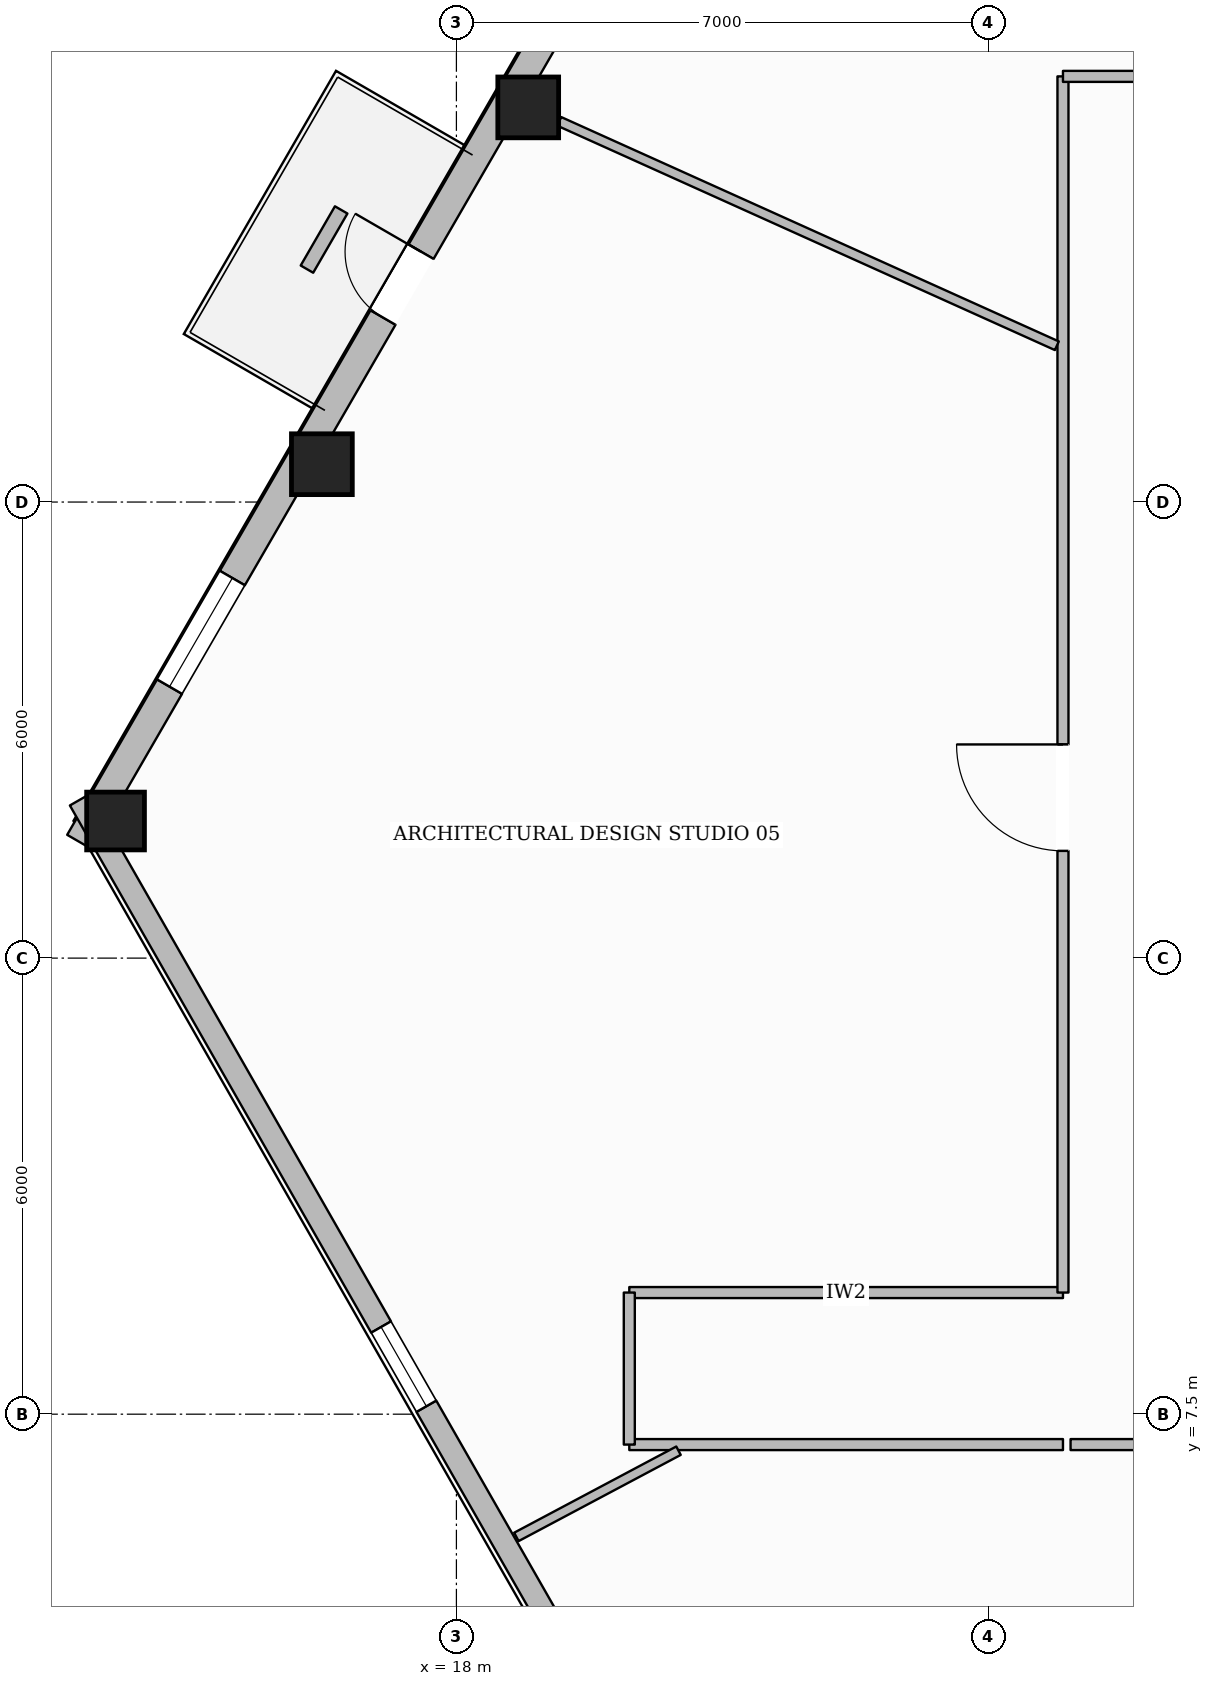
"""IFC4 building model, lengths in metres.
Left out: names, types, materials, properties, quantities, classifications, styles, units other than length and angle.
Written with IfcOpenShell. Run it as: python <this file> out.ifc"""

import sys

from ifc_helpers import new_model, si_unit, direction, frame, frame_2d, origin, origin_2d, place, context, subcontext, project, spatial, rectangle, hollow_rectangle, extrude, element, fill, save


model = new_model("IFC4")
c1 = context("Model", 3, precision=1e-05, world=origin(), true_north=direction((0.0, 1.0)))
c2 = subcontext(c1, "Body", "Model", "MODEL_VIEW")
j1 = project(units=[si_unit("LENGTHUNIT", "METRE"), si_unit("PLANEANGLEUNIT", "RADIAN")], contexts=[c1])
p1 = place(None, origin())
s1 = spatial("IfcSite", under=j1, at=p1, CompositionType="ELEMENT")
p2 = place(p1, origin())
s2 = spatial("IfcBuilding", under=s1, at=p2, CompositionType="ELEMENT")
p3 = place(p2, frame((0.0, 0.0, 9.85)))
s3 = spatial("IfcBuildingStorey", under=s2, at=p3, CompositionType="ELEMENT", Elevation=9.85)
for number, where, z_axis, x_axis in (
    (1, (18.945, 24.692, 0.0), (0.0, 0.0, 1.0), (1.0, 0.0, 0.0)),
    (2, (16.23, 19.998, 0.0), (0.0, 0.0, 1.0), (1.0, 0.0, 0.0)),
):
    element("IfcColumn", number, at=place(p3, frame(where, z_axis=z_axis, x_axis=x_axis)), inside=s3, PredefinedType="COLUMN", context=c2, shape_type="SweptSolid", body=[
        extrude(hollow_rectangle(XDim=0.8, YDim=0.8, WallThickness=0.036, at=origin_2d()), origin(), (0.0, 0.0, 1.0), 3.59),
    ])
p4 = place(p3, frame((13.516, 15.304, 0.0), z_axis=(0.0, 0.0, 1.0), x_axis=(1.0, 0.0, 0.0)))
e3 = element("IfcColumn", 3, at=p4, inside=s3, PredefinedType="COLUMN", context=c2, shape_type="SweptSolid", body=[
    extrude(hollow_rectangle(XDim=0.76, YDim=0.76, WallThickness=0.035, at=origin_2d()), origin(), (0.0, 0.0, 1.0), 3.59),
])
p5 = place(p3, frame((13.044, 15.027, 0.0), z_axis=(0.0, 0.0, 1.0), x_axis=(0.500616330433, 0.865669272704, 0.0)))
e4 = element("IfcWall", 4, at=p5, inside=s3, PredefinedType="STANDARD", context=c2, shape_type="SweptSolid", body=[
    extrude(rectangle(XDim=33.487, YDim=0.38, at=frame_2d((16.743, 0.0))), origin(), (0.0, 0.0, 1.0), 2.97),
])
p6 = place(p5, frame((7.972, 0.0, 0.0)))
e5 = element("IfcOpeningElement", 5, at=p6, cuts=e4, PredefinedType="OPENING", context=c2, shape_type="SweptSolid", body=[
    extrude(rectangle(XDim=1.0, YDim=2.2, at=frame_2d((0.5, 1.1))), frame((0.0, 0.2, 0.0), z_axis=(0.0, -1.0, 0.0), x_axis=(1.0, 0.0, 0.0)), (0.0, 0.0, 1.0), 0.4),
])
p7 = place(p5, frame((29.475, 0.0, 0.65)))
e6 = element("IfcOpeningElement", 6, at=p7, cuts=e4, PredefinedType="OPENING", context=c2, shape_type="SweptSolid", body=[
    extrude(rectangle(XDim=1.65, YDim=1.75, at=frame_2d((0.825, 0.875))), frame((0.0, 0.2, 0.0), z_axis=(0.0, -1.0, 0.0), x_axis=(1.0, 0.0, 0.0)), (0.0, 0.0, 1.0), 0.4),
])
p8 = place(p5, frame((24.052, 0.0, 0.65)))
e7 = element("IfcOpeningElement", 7, at=p8, cuts=e4, PredefinedType="OPENING", context=c2, shape_type="SweptSolid", body=[
    extrude(rectangle(XDim=1.65, YDim=1.75, at=frame_2d((0.825, 0.875))), frame((0.0, 0.2, 0.0), z_axis=(0.0, -1.0, 0.0), x_axis=(1.0, 0.0, 0.0)), (0.0, 0.0, 1.0), 0.4),
])
p9 = place(p5, frame((18.63, 0.0, 0.65)))
e8 = element("IfcOpeningElement", 8, at=p9, cuts=e4, PredefinedType="OPENING", context=c2, shape_type="SweptSolid", body=[
    extrude(rectangle(XDim=1.65, YDim=1.75, at=frame_2d((0.825, 0.875))), frame((0.0, 0.2, 0.0), z_axis=(0.0, -1.0, 0.0), x_axis=(1.0, 0.0, 0.0)), (0.0, 0.0, 1.0), 0.4),
])
p10 = place(p5, frame((2.362, 0.0, 0.65)))
e9 = element("IfcOpeningElement", 9, at=p10, cuts=e4, PredefinedType="OPENING", context=c2, shape_type="SweptSolid", body=[
    extrude(rectangle(XDim=1.65, YDim=1.75, at=frame_2d((0.825, 0.875))), frame((0.0, 0.2, 0.0), z_axis=(0.0, -1.0, 0.0), x_axis=(1.0, 0.0, 0.0)), (0.0, 0.0, 1.0), 0.4),
])
p11 = place(p3, frame((21.569, 0.668, 0.0), z_axis=(0.0, 0.0, 1.0), x_axis=(-0.496201687206, 0.868207282631, 0.0)))
e10 = element("IfcWall", 10, at=p11, inside=s3, PredefinedType="STANDARD", context=c2, shape_type="SweptSolid", body=[
    extrude(rectangle(XDim=17.179, YDim=0.3, at=frame_2d((8.589, 0.0))), origin(), (0.0, 0.0, 1.0), 2.97),
])
p12 = place(p11, frame((7.989, 0.0, 0.65)))
e11 = element("IfcOpeningElement", 11, at=p12, cuts=e10, PredefinedType="OPENING", context=c2, shape_type="SweptSolid", body=[
    extrude(rectangle(XDim=1.2, YDim=1.7, at=frame_2d((0.6, 0.85))), frame((0.0, 0.16, 0.0), z_axis=(0.0, -1.0, 0.0), x_axis=(1.0, 0.0, 0.0)), (0.0, 0.0, 1.0), 0.32),
])
p13 = place(p3, frame((16.484, 23.343, 0.0), z_axis=(0.0, 0.0, 1.0), x_axis=(-0.500544251447, -0.86571095196, 0.0)))
e12 = element("IfcWall", 12, at=p13, inside=s3, PredefinedType="USERDEFINED", context=c2, shape_type="SweptSolid", body=[
    extrude(rectangle(XDim=0.9, YDim=0.19, at=frame_2d((0.45, 0.0))), origin(), (0.0, 0.0, 1.0), 0.5),
])
p14 = place(p3, frame((20.275, 9.1, 0.0), z_axis=(0.0, 0.0, 1.0), x_axis=(1.0, 0.0, 0.0)))
e13 = element("IfcWall", 13, at=p14, inside=s3, PredefinedType="PARTITIONING", context=c2, shape_type="SweptSolid", body=[
    extrude(rectangle(XDim=5.705, YDim=0.145, at=frame_2d((2.853, 0.0))), origin(), (0.0, 0.0, 1.0), 3.59),
])
p15 = place(p3, frame((25.98, 9.1, 0.0), z_axis=(0.0, 0.0, 1.0), x_axis=(0.0, 1.0, 0.0)))
e14 = element("IfcWall", 14, at=p15, inside=s3, PredefinedType="PARTITIONING", context=c2, shape_type="SweptSolid", body=[
    extrude(rectangle(XDim=16.0, YDim=0.145, at=frame_2d((8.0, 0.0))), origin(), (0.0, 0.0, 1.0), 3.278),
])
p16 = place(p15, frame((5.811, 0.0, 0.0)))
e15 = element("IfcOpeningElement", 15, at=p16, cuts=e14, PredefinedType="OPENING", context=c2, shape_type="SweptSolid", body=[
    extrude(rectangle(XDim=1.4, YDim=2.2, at=frame_2d((0.7, 1.1))), frame((0.0, 0.083, 0.0), z_axis=(0.0, -1.0, 0.0), x_axis=(1.0, 0.0, 0.0)), (0.0, 0.0, 1.0), 0.165),
])
p17 = place(p3, frame((25.98, 25.1, 0.0), z_axis=(0.0, 0.0, 1.0), x_axis=(1.0, 0.0, 0.0)))
e16 = element("IfcWall", 16, at=p17, inside=s3, PredefinedType="PARTITIONING", context=c2, shape_type="SweptSolid", body=[
    extrude(rectangle(XDim=11.02, YDim=0.145, at=frame_2d((5.51, 0.0))), origin(), (0.0, 0.0, 1.0), 3.59),
])
p18 = place(p17, frame((3.01, 0.0, 0.0)))
e17 = element("IfcOpeningElement", 17, at=p18, cuts=e16, PredefinedType="OPENING", context=c2, shape_type="SweptSolid", body=[
    extrude(rectangle(XDim=1.4, YDim=2.2, at=frame_2d((0.7, 1.1))), frame((0.0, 0.083, 0.0), z_axis=(0.0, -1.0, 0.0), x_axis=(1.0, 0.0, 0.0)), (0.0, 0.0, 1.0), 0.165),
])
p19 = place(p3, frame((49.92, 7.1, 0.0), z_axis=(0.0, 0.0, 1.0), x_axis=(-1.0, 0.0, 0.0)))
e18 = element("IfcWall", 18, at=p19, inside=s3, PredefinedType="PARTITIONING", context=c2, shape_type="SweptSolid", body=[
    extrude(rectangle(XDim=23.84, YDim=0.145, at=frame_2d((11.92, 0.0))), origin(), (0.0, 0.0, 1.0), 3.278),
])
p20 = place(p19, frame((18.48, 0.0, 0.0)))
e19 = element("IfcOpeningElement", 19, at=p20, cuts=e18, PredefinedType="OPENING", context=c2, shape_type="SweptSolid", body=[
    extrude(rectangle(XDim=0.88, YDim=2.1, at=frame_2d((0.44, 1.05))), frame((0.0, 0.083, 0.0), z_axis=(0.0, -1.0, 0.0), x_axis=(1.0, 0.0, 0.0)), (0.0, 0.0, 1.0), 0.165),
])
p21 = place(p19, frame((15.96, 0.0, 0.0)))
e20 = element("IfcOpeningElement", 20, at=p21, cuts=e18, PredefinedType="OPENING", context=c2, shape_type="SweptSolid", body=[
    extrude(rectangle(XDim=0.88, YDim=2.1, at=frame_2d((0.44, 1.05))), frame((0.0, 0.083, 0.0), z_axis=(0.0, -1.0, 0.0), x_axis=(1.0, 0.0, 0.0)), (0.0, 0.0, 1.0), 0.165),
])
p22 = place(p19, frame((13.5, 0.0, 0.0)))
e21 = element("IfcOpeningElement", 21, at=p22, cuts=e18, PredefinedType="OPENING", context=c2, shape_type="SweptSolid", body=[
    extrude(rectangle(XDim=0.96, YDim=2.1, at=frame_2d((0.48, 1.05))), frame((0.0, 0.083, 0.0), z_axis=(0.0, -1.0, 0.0), x_axis=(1.0, 0.0, 0.0)), (0.0, 0.0, 1.0), 0.165),
])
p23 = place(p19, frame((5.801, 0.0, 0.0)))
e22 = element("IfcOpeningElement", 22, at=p23, cuts=e18, PredefinedType="OPENING", context=c2, shape_type="SweptSolid", body=[
    extrude(rectangle(XDim=1.4, YDim=2.2, at=frame_2d((0.7, 1.1))), frame((0.0, 0.083, 0.0), z_axis=(0.0, -1.0, 0.0), x_axis=(1.0, 0.0, 0.0)), (0.0, 0.0, 1.0), 0.165),
])
p24 = place(p3, frame((25.98, 7.1, 0.0), z_axis=(0.0, 0.0, 1.0), x_axis=(-1.0, 0.0, 0.0)))
e23 = element("IfcWall", 23, at=p24, inside=s3, PredefinedType="PARTITIONING", context=c2, shape_type="SweptSolid", body=[
    extrude(rectangle(XDim=5.705, YDim=0.145, at=frame_2d((2.853, 0.0))), origin(), (0.0, 0.0, 1.0), 3.59),
])
p25 = place(p3, frame((20.275, 7.1, 0.0), z_axis=(0.0, 0.0, 1.0), x_axis=(0.0, 1.0, 0.0)))
e24 = element("IfcWall", 24, at=p25, inside=s3, PredefinedType="PARTITIONING", context=c2, shape_type="SweptSolid", body=[
    extrude(rectangle(XDim=2.0, YDim=0.145, at=frame_2d((1.0, 0.0))), origin(), (0.0, 0.0, 1.0), 3.59),
])
p26 = place(p3, frame((25.899, 21.556, 0.0), z_axis=(0.0, 0.0, 1.0), x_axis=(-0.911612735683, 0.411050143097, 0.0)))
e25 = element("IfcWall", 25, at=p26, inside=s3, PredefinedType="PARTITIONING", context=c2, shape_type="SweptSolid", body=[
    extrude(rectangle(XDim=7.181, YDim=0.125, at=frame_2d((3.591, 0.0))), origin(), (0.0, 0.0, 1.0), 3.057),
])
p27 = place(p3, frame((20.922, 7.02, 0.0), z_axis=(0.0, 0.0, 1.0), x_axis=(-0.882950818639, -0.469465495926, 0.0)))
e26 = element("IfcWall", 26, at=p27, inside=s3, PredefinedType="PARTITIONING", context=c2, shape_type="SweptSolid", body=[
    extrude(rectangle(XDim=2.416, YDim=0.125, at=frame_2d((1.208, 0.0))), origin(), (0.0, 0.0, 1.0), 3.59),
])
p28 = place(p6, origin())
e27 = element("IfcDoor", 27, at=p28, inside=s3, OperationType="SINGLE_SWING_RIGHT", PredefinedType="DOOR", context=c2, shape_type="SweptSolid", body=[
    extrude(rectangle(XDim=1.0, YDim=2.2, at=frame_2d((0.5, 1.1))), frame((0.0, 0.025, 0.0), z_axis=(0.0, -1.0, 0.0), x_axis=(1.0, 0.0, 0.0)), (0.0, 0.0, 1.0), 0.05),
])
fill(e5, e27)
p29 = place(p10, origin())
e28 = element("IfcWindow", 28, at=p29, inside=s3, PartitioningType="SINGLE_PANEL", PredefinedType="WINDOW", context=c2, shape_type="SweptSolid", body=[
    extrude(rectangle(XDim=1.65, YDim=1.75, at=frame_2d((0.825, 0.875))), frame((0.0, 0.03, 0.0), z_axis=(0.0, -1.0, 0.0), x_axis=(1.0, 0.0, 0.0)), (0.0, 0.0, 1.0), 0.06),
])
fill(e9, e28)
p30 = place(p12, origin())
e29 = element("IfcWindow", 29, at=p30, inside=s3, PartitioningType="SINGLE_PANEL", PredefinedType="WINDOW", context=c2, shape_type="SweptSolid", body=[
    extrude(rectangle(XDim=1.2, YDim=1.7, at=frame_2d((0.6, 0.85))), frame((0.0, 0.03, 0.0), z_axis=(0.0, -1.0, 0.0), x_axis=(1.0, 0.0, 0.0)), (0.0, 0.0, 1.0), 0.06),
])
fill(e11, e29)
p31 = place(p16, origin())
e30 = element("IfcDoor", 30, at=p31, inside=s3, OperationType="SINGLE_SWING_RIGHT", PredefinedType="DOOR", context=c2, shape_type="SweptSolid", body=[
    extrude(rectangle(XDim=1.4, YDim=2.2, at=frame_2d((0.7, 1.1))), frame((0.0, 0.025, 0.0), z_axis=(0.0, -1.0, 0.0), x_axis=(1.0, 0.0, 0.0)), (0.0, 0.0, 1.0), 0.05),
])
fill(e15, e30)
save(model, sys.argv[1])
